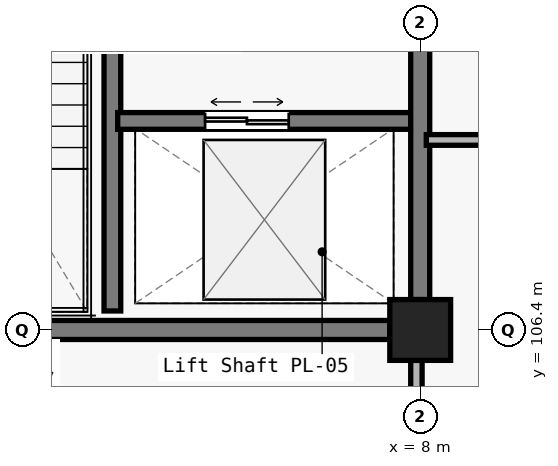
"""IFC4 building model, lengths in metres.
Left out: names, types, materials, properties, quantities, classifications, styles, units other than length and angle.
Written with IfcOpenShell. Run it as: python <this file> out.ifc"""

import sys

from ifc_helpers import new_model, si_unit, direction, frame, frame_2d, origin, origin_2d, place, context, subcontext, project, spatial, rectangle, extrude, element, fill, save


model = new_model("IFC4")
c1 = context("Model", 3, precision=1e-05, world=origin(), true_north=direction((0.0, 1.0)))
c2 = subcontext(c1, "Body", "Model", "MODEL_VIEW")
j1 = project(units=[si_unit("LENGTHUNIT", "METRE"), si_unit("PLANEANGLEUNIT", "RADIAN")], contexts=[c1])
p1 = place(None, origin())
s1 = spatial("IfcSite", under=j1, at=p1, CompositionType="ELEMENT")
p2 = place(p1, origin())
s2 = spatial("IfcBuilding", under=s1, at=p2, CompositionType="ELEMENT")
p3 = place(p2, frame((0.0, 0.0, 5.4)))
s3 = spatial("IfcBuildingStorey", under=s2, at=p3, CompositionType="ELEMENT", Elevation=5.4)
p4 = place(p3, frame((8.0, 106.4, 0.0), z_axis=(0.0, 0.0, 1.0), x_axis=(1.0, 0.0, 0.0)))
e1 = element("IfcColumn", 1, at=p4, inside=s3, PredefinedType="COLUMN", context=c2, shape_type="SweptSolid", body=[
    extrude(rectangle(XDim=0.8, YDim=0.8, at=origin_2d()), origin(), (0.0, 0.0, 1.0), 4.8),
])
p5 = place(p3, frame((0.325, 106.4, 0.0), z_axis=(0.0, 0.0, 1.0), x_axis=(1.0, 0.0, 0.0)))
e2 = element("IfcWall", 2, at=p5, inside=s3, PredefinedType="SOLIDWALL", context=c2, shape_type="SweptSolid", body=[
    extrude(rectangle(XDim=7.275, YDim=0.25, at=frame_2d((3.638, 0.0))), origin(), (0.0, 0.0, 1.0), 3.685),
])
p6 = place(p3, frame((3.95, 106.65, 0.0), z_axis=(0.0, 0.0, 1.0), x_axis=(0.0, 1.0, 0.0)))
e3 = element("IfcWall", 3, at=p6, inside=s3, PredefinedType="SOLIDWALL", context=c2, shape_type="SweptSolid", body=[
    extrude(rectangle(XDim=7.1, YDim=0.22, at=frame_2d((3.55, 0.0))), origin(), (0.0, 0.0, 1.0), 4.51),
])
p7 = place(p6, frame((5.55, 0.0, 0.0)))
e4 = element("IfcOpeningElement", 4, at=p7, cuts=e3, PredefinedType="OPENING", context=c2, shape_type="SweptSolid", body=[
    extrude(rectangle(XDim=1.2, YDim=2.15, at=frame_2d((0.6, 1.075))), frame((0.0, 0.12, 0.0), z_axis=(0.0, -1.0, 0.0), x_axis=(1.0, 0.0, 0.0)), (0.0, 0.0, 1.0), 0.24),
])
p8 = place(p3, frame((4.02, 109.15, 0.0), z_axis=(0.0, 0.0, 1.0), x_axis=(1.0, 0.0, 0.0)))
e5 = element("IfcWall", 5, at=p8, inside=s3, PredefinedType="SOLIDWALL", context=c2, shape_type="SweptSolid", body=[
    extrude(rectangle(XDim=3.93, YDim=0.22, at=frame_2d((1.965, 0.0))), origin(), (0.0, 0.0, 1.0), 3.86),
])
p9 = place(p8, frame((1.15, 0.0, 0.0)))
e6 = element("IfcOpeningElement", 6, at=p9, cuts=e5, PredefinedType="OPENING", context=c2, shape_type="SweptSolid", body=[
    extrude(rectangle(XDim=1.1, YDim=2.2, at=frame_2d((0.55, 1.1))), frame((0.0, 0.12, 0.0), z_axis=(0.0, -1.0, 0.0), x_axis=(1.0, 0.0, 0.0)), (0.0, 0.0, 1.0), 0.24),
])
p10 = place(p3, frame((8.0, 106.8, 0.0), z_axis=(0.0, 0.0, 1.0), x_axis=(0.0, 1.0, 0.0)))
e7 = element("IfcWall", 7, at=p10, inside=s3, PredefinedType="SOLIDWALL", context=c2, shape_type="SweptSolid", body=[
    extrude(rectangle(XDim=6.85, YDim=0.25, at=frame_2d((3.425, 0.0))), origin(), (0.0, 0.0, 1.0), 3.735),
])
p11 = place(p10, frame((3.45, 0.0, 0.0)))
e8 = element("IfcOpeningElement", 8, at=p11, cuts=e7, PredefinedType="OPENING", context=c2, shape_type="SweptSolid", body=[
    extrude(rectangle(XDim=1.35, YDim=2.2, at=frame_2d((0.675, 1.1))), frame((0.0, 0.135, 0.0), z_axis=(0.0, -1.0, 0.0), x_axis=(1.0, 0.0, 0.0)), (0.0, 0.0, 1.0), 0.27),
])
p12 = place(p3, frame((8.08, 108.9, 0.0), z_axis=(0.0, 0.0, 1.0), x_axis=(1.0, 0.0, 0.0)))
e9 = element("IfcWall", 9, at=p12, inside=s3, PredefinedType="PARTITIONING", context=c2, shape_type="SweptSolid", body=[
    extrude(rectangle(XDim=13.188, YDim=0.14, at=frame_2d((6.594, 0.0))), origin(), (0.0, 0.0, 1.0), 3.835),
])
p13 = place(p12, frame((3.744, 0.0, 0.0)))
e10 = element("IfcOpeningElement", 10, at=p13, cuts=e9, PredefinedType="OPENING", context=c2, shape_type="SweptSolid", body=[
    extrude(rectangle(XDim=1.02, YDim=2.1, at=frame_2d((0.51, 1.05))), frame((0.0, 0.08, 0.0), z_axis=(0.0, -1.0, 0.0), x_axis=(1.0, 0.0, 0.0)), (0.0, 0.0, 1.0), 0.16),
])
p14 = place(p3, frame((7.95, 68.775, 0.0), z_axis=(0.0, 0.0, 1.0), x_axis=(0.0, 1.0, 0.0)))
e11 = element("IfcWall", 11, at=p14, inside=s3, PredefinedType="PARTITIONING", context=c2, shape_type="SweptSolid", body=[
    extrude(rectangle(XDim=37.225, YDim=0.15, at=frame_2d((18.613, 0.0))), origin(), (0.0, 0.0, 1.0), 2.69),
])
p15 = place(p14, frame((3.425, 0.0, 0.0)))
e12 = element("IfcOpeningElement", 12, at=p15, cuts=e11, PredefinedType="OPENING", context=c2, shape_type="SweptSolid", body=[
    extrude(rectangle(XDim=0.98, YDim=2.15, at=frame_2d((0.49, 1.075))), frame((0.0, 0.085, 0.0), z_axis=(0.0, -1.0, 0.0), x_axis=(1.0, 0.0, 0.0)), (0.0, 0.0, 1.0), 0.17),
])
p16 = place(p14, frame((26.225, 0.0, 0.0)))
e13 = element("IfcOpeningElement", 13, at=p16, cuts=e11, PredefinedType="OPENING", context=c2, shape_type="SweptSolid", body=[
    extrude(rectangle(XDim=1.01, YDim=2.15, at=frame_2d((0.505, 1.075))), frame((0.0, 0.085, 0.0), z_axis=(0.0, -1.0, 0.0), x_axis=(1.0, 0.0, 0.0)), (0.0, 0.0, 1.0), 0.17),
])
p17 = place(p9, origin())
e14 = element("IfcDoor", 14, at=p17, inside=s3, OperationType="DOUBLE_DOOR_SLIDING", PredefinedType="DOOR", context=c2, shape_type="SweptSolid", body=[
    extrude(rectangle(XDim=1.1, YDim=2.2, at=frame_2d((0.55, 1.1))), frame((0.0, 0.025, 0.0), z_axis=(0.0, -1.0, 0.0), x_axis=(1.0, 0.0, 0.0)), (0.0, 0.0, 1.0), 0.05),
])
fill(e6, e14)
save(model, sys.argv[1])
